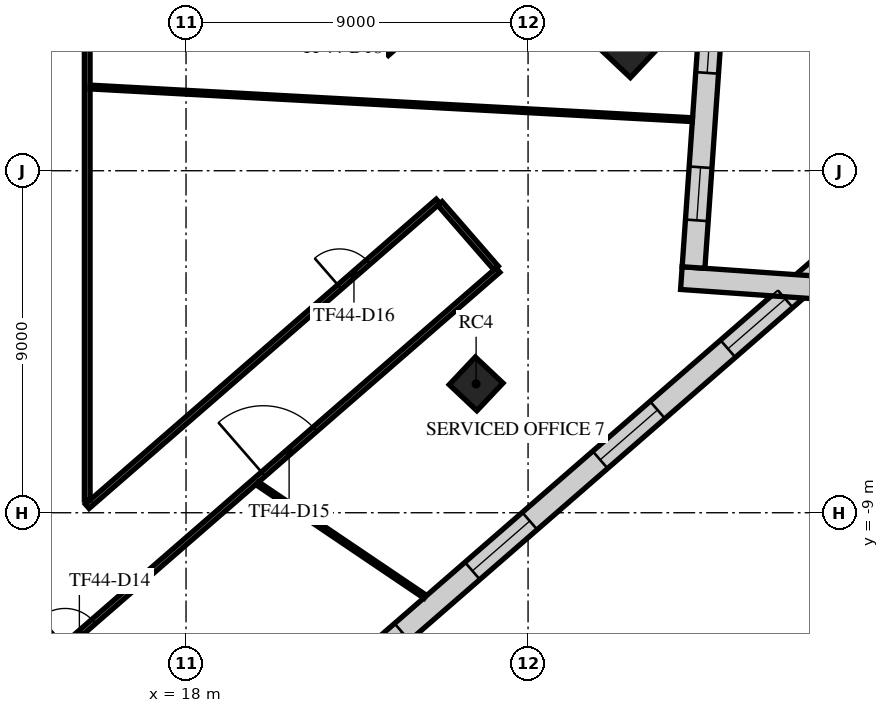
"""IFC4 building model, lengths in metres.
Left out: names, types, materials, properties, quantities, classifications, styles, units other than length and angle.
Written with IfcOpenShell. Run it as: python <this file> out.ifc"""

import sys

from ifc_helpers import new_model, si_unit, direction, frame, frame_2d, origin, origin_2d, place, context, subcontext, project, spatial, rectangle, extrude, element, fill, save


model = new_model("IFC4")
c1 = context("Model", 3, precision=1e-05, world=origin(), true_north=direction((0.0, 1.0)))
c2 = subcontext(c1, "Body", "Model", "MODEL_VIEW")
j1 = project(units=[si_unit("LENGTHUNIT", "METRE"), si_unit("PLANEANGLEUNIT", "RADIAN")], contexts=[c1])
p1 = place(None, origin())
s1 = spatial("IfcSite", under=j1, at=p1, CompositionType="ELEMENT")
p2 = place(p1, origin())
s2 = spatial("IfcBuilding", under=s1, at=p2, CompositionType="ELEMENT")
p3 = place(p2, frame((0.0, 0.0, 193.3)))
s3 = spatial("IfcBuildingStorey", under=s2, at=p3, CompositionType="ELEMENT", Elevation=193.3)
p4 = place(p3, frame((25.633, -5.609, 0.0), z_axis=(0.0, 0.0, 1.0), x_axis=(0.685916152371, 0.727680583715, 0.0)))
e1 = element("IfcColumn", 1, at=p4, inside=s3, PredefinedType="COLUMN", context=c2, shape_type="SweptSolid", body=[
    extrude(rectangle(XDim=1.0, YDim=1.0, at=origin_2d()), origin(), (0.0, 0.0, 1.0), 4.0),
])
p5 = place(p3, frame((29.659, 3.582, 0.0), z_axis=(0.0, 0.0, 1.0), x_axis=(0.685916152371, 0.727680583715, 0.0)))
e2 = element("IfcColumn", 2, at=p5, inside=s3, PredefinedType="COLUMN", context=c2, shape_type="SweptSolid", body=[
    extrude(rectangle(XDim=1.6, YDim=1.6, at=origin_2d()), origin(), (0.0, 0.0, 1.0), 4.0),
])
p6 = place(p3, frame((-2.286, -34.715, 0.0), z_axis=(0.0, 0.0, 1.0), x_axis=(0.754708272811, 0.656060532993, 0.0)))
e3 = element("IfcWall", 3, at=p6, inside=s3, PredefinedType="STANDARD", context=c2, shape_type="SweptSolid", body=[
    extrude(rectangle(XDim=49.0, YDim=0.6, at=frame_2d((24.5, 0.0))), origin(), (0.0, 0.0, 1.0), 3.62),
])
p7 = place(p6, frame((1.227, 0.0, 0.9)))
e4 = element("IfcOpeningElement", 4, at=p7, cuts=e3, PredefinedType="OPENING", context=c2, shape_type="SweptSolid", body=[
    extrude(rectangle(XDim=2.0, YDim=2.1, at=frame_2d((1.0, 1.05))), frame((0.0, 0.31, 0.0), z_axis=(0.0, -1.0, 0.0), x_axis=(1.0, 0.0, 0.0)), (0.0, 0.0, 1.0), 0.62),
])
p8 = place(p6, frame((5.682, 0.0, 0.9)))
e5 = element("IfcOpeningElement", 5, at=p8, cuts=e3, PredefinedType="OPENING", context=c2, shape_type="SweptSolid", body=[
    extrude(rectangle(XDim=2.0, YDim=2.1, at=frame_2d((1.0, 1.05))), frame((0.0, 0.31, 0.0), z_axis=(0.0, -1.0, 0.0), x_axis=(1.0, 0.0, 0.0)), (0.0, 0.0, 1.0), 0.62),
])
p9 = place(p6, frame((10.136, 0.0, 0.9)))
e6 = element("IfcOpeningElement", 6, at=p9, cuts=e3, PredefinedType="OPENING", context=c2, shape_type="SweptSolid", body=[
    extrude(rectangle(XDim=2.0, YDim=2.1, at=frame_2d((1.0, 1.05))), frame((0.0, 0.31, 0.0), z_axis=(0.0, -1.0, 0.0), x_axis=(1.0, 0.0, 0.0)), (0.0, 0.0, 1.0), 0.62),
])
p10 = place(p6, frame((14.591, 0.0, 0.9)))
e7 = element("IfcOpeningElement", 7, at=p10, cuts=e3, PredefinedType="OPENING", context=c2, shape_type="SweptSolid", body=[
    extrude(rectangle(XDim=2.0, YDim=2.1, at=frame_2d((1.0, 1.05))), frame((0.0, 0.31, 0.0), z_axis=(0.0, -1.0, 0.0), x_axis=(1.0, 0.0, 0.0)), (0.0, 0.0, 1.0), 0.62),
])
p11 = place(p6, frame((19.045, 0.0, 0.9)))
e8 = element("IfcOpeningElement", 8, at=p11, cuts=e3, PredefinedType="OPENING", context=c2, shape_type="SweptSolid", body=[
    extrude(rectangle(XDim=2.0, YDim=2.1, at=frame_2d((1.0, 1.05))), frame((0.0, 0.31, 0.0), z_axis=(0.0, -1.0, 0.0), x_axis=(1.0, 0.0, 0.0)), (0.0, 0.0, 1.0), 0.62),
])
p12 = place(p6, frame((23.5, 0.0, 0.9)))
e9 = element("IfcOpeningElement", 9, at=p12, cuts=e3, PredefinedType="OPENING", context=c2, shape_type="SweptSolid", body=[
    extrude(rectangle(XDim=2.0, YDim=2.1, at=frame_2d((1.0, 1.05))), frame((0.0, 0.31, 0.0), z_axis=(0.0, -1.0, 0.0), x_axis=(1.0, 0.0, 0.0)), (0.0, 0.0, 1.0), 0.62),
])
p13 = place(p6, frame((27.955, 0.0, 0.9)))
e10 = element("IfcOpeningElement", 10, at=p13, cuts=e3, PredefinedType="OPENING", context=c2, shape_type="SweptSolid", body=[
    extrude(rectangle(XDim=2.0, YDim=2.1, at=frame_2d((1.0, 1.05))), frame((0.0, 0.31, 0.0), z_axis=(0.0, -1.0, 0.0), x_axis=(1.0, 0.0, 0.0)), (0.0, 0.0, 1.0), 0.62),
])
p14 = place(p6, frame((32.409, 0.0, 0.9)))
e11 = element("IfcOpeningElement", 11, at=p14, cuts=e3, PredefinedType="OPENING", context=c2, shape_type="SweptSolid", body=[
    extrude(rectangle(XDim=2.0, YDim=2.1, at=frame_2d((1.0, 1.05))), frame((0.0, 0.31, 0.0), z_axis=(0.0, -1.0, 0.0), x_axis=(1.0, 0.0, 0.0)), (0.0, 0.0, 1.0), 0.62),
])
p15 = place(p6, frame((36.864, 0.0, 0.9)))
e12 = element("IfcOpeningElement", 12, at=p15, cuts=e3, PredefinedType="OPENING", context=c2, shape_type="SweptSolid", body=[
    extrude(rectangle(XDim=2.0, YDim=2.1, at=frame_2d((1.0, 1.05))), frame((0.0, 0.31, 0.0), z_axis=(0.0, -1.0, 0.0), x_axis=(1.0, 0.0, 0.0)), (0.0, 0.0, 1.0), 0.62),
])
p16 = place(p6, frame((41.318, 0.0, 0.9)))
e13 = element("IfcOpeningElement", 13, at=p16, cuts=e3, PredefinedType="OPENING", context=c2, shape_type="SweptSolid", body=[
    extrude(rectangle(XDim=2.0, YDim=2.1, at=frame_2d((1.0, 1.05))), frame((0.0, 0.31, 0.0), z_axis=(0.0, -1.0, 0.0), x_axis=(1.0, 0.0, 0.0)), (0.0, 0.0, 1.0), 0.62),
])
p17 = place(p6, frame((45.773, 0.0, 0.9)))
e14 = element("IfcOpeningElement", 14, at=p17, cuts=e3, PredefinedType="OPENING", context=c2, shape_type="SweptSolid", body=[
    extrude(rectangle(XDim=2.0, YDim=2.1, at=frame_2d((1.0, 1.05))), frame((0.0, 0.31, 0.0), z_axis=(0.0, -1.0, 0.0), x_axis=(1.0, 0.0, 0.0)), (0.0, 0.0, 1.0), 0.62),
])
p18 = place(p3, frame((34.871, -3.094, 0.0), z_axis=(0.0, 0.0, 1.0), x_axis=(-0.997563916762, 0.069758382828, 0.0)))
e15 = element("IfcWall", 15, at=p18, inside=s3, PredefinedType="STANDARD", context=c2, shape_type="SweptSolid", body=[
    extrude(rectangle(XDim=3.846, YDim=0.6, at=frame_2d((1.923, 0.0))), origin(), (0.0, 0.0, 1.0), 3.62),
])
p19 = place(p3, frame((31.354, -2.547, 0.0), z_axis=(0.0, 0.0, 1.0), x_axis=(0.069743544409, 0.997564954283, 0.0)))
e16 = element("IfcWall", 16, at=p19, inside=s3, PredefinedType="STANDARD", context=c2, shape_type="SweptSolid", body=[
    extrude(rectangle(XDim=7.778, YDim=0.6, at=frame_2d((3.889, 0.0))), origin(), (0.0, 0.0, 1.0), 3.62),
])
p20 = place(p19, frame((1.244, 0.0, 0.9)))
e17 = element("IfcOpeningElement", 17, at=p20, cuts=e16, PredefinedType="OPENING", context=c2, shape_type="SweptSolid", body=[
    extrude(rectangle(XDim=1.4, YDim=2.1, at=frame_2d((0.7, 1.05))), frame((0.0, 0.31, 0.0), z_axis=(0.0, -1.0, 0.0), x_axis=(1.0, 0.0, 0.0)), (0.0, 0.0, 1.0), 0.62),
])
p21 = place(p19, frame((5.134, 0.0, 0.9)))
e18 = element("IfcOpeningElement", 18, at=p21, cuts=e16, PredefinedType="OPENING", context=c2, shape_type="SweptSolid", body=[
    extrude(rectangle(XDim=1.4, YDim=2.1, at=frame_2d((0.7, 1.05))), frame((0.0, 0.31, 0.0), z_axis=(0.0, -1.0, 0.0), x_axis=(1.0, 0.0, 0.0)), (0.0, 0.0, 1.0), 0.62),
])
p22 = place(p3, frame((-1.0, -26.268, 0.0), z_axis=(0.0, 0.0, 1.0), x_axis=(0.754711356604, 0.656056985492, 0.0)))
e19 = element("IfcWall", 19, at=p22, inside=s3, PredefinedType="PARTITIONING", context=c2, shape_type="SweptSolid", body=[
    extrude(rectangle(XDim=36.052, YDim=0.15, at=frame_2d((18.026, 0.0))), origin(), (0.0, 0.0, 1.0), 3.17),
])
p23 = place(p22, frame((9.598, 0.0, 0.0)))
e20 = element("IfcOpeningElement", 20, at=p23, cuts=e19, PredefinedType="OPENING", context=c2, shape_type="SweptSolid", body=[
    extrude(rectangle(XDim=1.0, YDim=2.1, at=frame_2d((0.5, 1.05))), frame((0.0, 0.085, 0.0), z_axis=(0.0, -1.0, 0.0), x_axis=(1.0, 0.0, 0.0)), (0.0, 0.0, 1.0), 0.17),
])
p24 = place(p22, frame((20.957, 0.0, 0.0)))
e21 = element("IfcOpeningElement", 21, at=p24, cuts=e19, PredefinedType="OPENING", context=c2, shape_type="SweptSolid", body=[
    extrude(rectangle(XDim=1.0, YDim=2.1, at=frame_2d((0.5, 1.05))), frame((0.0, 0.085, 0.0), z_axis=(0.0, -1.0, 0.0), x_axis=(1.0, 0.0, 0.0)), (0.0, 0.0, 1.0), 0.17),
])
p25 = place(p22, frame((27.87, 0.0, 0.0)))
e22 = element("IfcOpeningElement", 22, at=p25, cuts=e19, PredefinedType="OPENING", context=c2, shape_type="SweptSolid", body=[
    extrude(rectangle(XDim=1.8, YDim=2.1, at=frame_2d((0.9, 1.05))), frame((0.0, 0.085, 0.0), z_axis=(0.0, -1.0, 0.0), x_axis=(1.0, 0.0, 0.0)), (0.0, 0.0, 1.0), 0.17),
])
p26 = place(p3, frame((15.4, -8.831, 0.0), z_axis=(0.0, 0.0, 1.0), x_axis=(0.754715065445, 0.656052718911, 0.0)))
e23 = element("IfcWall", 23, at=p26, inside=s3, PredefinedType="PARTITIONING", context=c2, shape_type="SweptSolid", body=[
    extrude(rectangle(XDim=12.234, YDim=0.15, at=frame_2d((6.117, 0.0))), origin(), (0.0, 0.0, 1.0), 3.17),
])
p27 = place(p26, frame((8.8, 0.0, 0.0)))
e24 = element("IfcOpeningElement", 24, at=p27, cuts=e23, PredefinedType="OPENING", context=c2, shape_type="SweptSolid", body=[
    extrude(rectangle(XDim=1.0, YDim=2.1, at=frame_2d((0.5, 1.05))), frame((0.0, 0.085, 0.0), z_axis=(0.0, -1.0, 0.0), x_axis=(1.0, 0.0, 0.0)), (0.0, 0.0, 1.0), 0.17),
])
p28 = place(p3, frame((15.4, -8.667, 0.0), z_axis=(0.0, 0.0, 1.0), x_axis=(0.0, 1.0, 0.0)))
e25 = element("IfcWall", 25, at=p28, inside=s3, PredefinedType="PARTITIONING", context=c2, shape_type="SweptSolid", body=[
    extrude(rectangle(XDim=15.944, YDim=0.15, at=frame_2d((7.972, 0.0))), origin(), (0.0, 0.0, 1.0), 3.17),
])
p29 = place(p3, frame((17.805, 9.268, 0.0), z_axis=(0.0, 0.0, 1.0), x_axis=(0.656027059873, -0.754737369364, 0.0)))
e26 = element("IfcWall", 26, at=p29, inside=s3, PredefinedType="PARTITIONING", context=c2, shape_type="SweptSolid", body=[
    extrude(rectangle(XDim=8.251, YDim=0.15, at=frame_2d((4.125, 0.0))), origin(), (0.0, 0.0, 1.0), 3.17),
])
p30 = place(p29, frame((1.05, 0.0, 0.0)))
e27 = element("IfcOpeningElement", 27, at=p30, cuts=e26, PredefinedType="OPENING", context=c2, shape_type="SweptSolid", body=[
    extrude(rectangle(XDim=1.8, YDim=2.1, at=frame_2d((0.9, 1.05))), frame((0.0, 0.085, 0.0), z_axis=(0.0, -1.0, 0.0), x_axis=(1.0, 0.0, 0.0)), (0.0, 0.0, 1.0), 0.17),
])
p31 = place(p29, frame((6.05, 0.0, 0.0)))
e28 = element("IfcOpeningElement", 28, at=p31, cuts=e26, PredefinedType="OPENING", context=c2, shape_type="SweptSolid", body=[
    extrude(rectangle(XDim=1.0, YDim=2.1, at=frame_2d((0.5, 1.05))), frame((0.0, 0.085, 0.0), z_axis=(0.0, -1.0, 0.0), x_axis=(1.0, 0.0, 0.0)), (0.0, 0.0, 1.0), 0.17),
])
p32 = place(p3, frame((23.275, 3.09, 0.0), z_axis=(0.0, 0.0, 1.0), x_axis=(0.754495728819, 0.656304955942, 0.0)))
e29 = element("IfcWall", 29, at=p32, inside=s3, PredefinedType="PARTITIONING", context=c2, shape_type="SweptSolid", body=[
    extrude(rectangle(XDim=2.25, YDim=0.15, at=frame_2d((1.125, 0.0))), origin(), (0.0, 0.0, 1.0), 3.17),
])
p33 = place(p3, frame((24.682, -0.862, 0.0), z_axis=(0.0, 0.0, 1.0), x_axis=(0.656243185308, -0.754549456123, 0.0)))
e30 = element("IfcWall", 30, at=p33, inside=s3, PredefinedType="PARTITIONING", context=c2, shape_type="SweptSolid", body=[
    extrude(rectangle(XDim=2.25, YDim=0.15, at=frame_2d((1.125, 0.0))), origin(), (0.0, 0.0, 1.0), 3.17),
])
p34 = place(p3, frame((15.478, 2.203, 0.0), z_axis=(0.0, 0.0, 1.0), x_axis=(0.998532575908, -0.054154361321, 0.0)))
e31 = element("IfcWall", 31, at=p34, inside=s3, PredefinedType="PARTITIONING", context=c2, shape_type="SweptSolid", body=[
    extrude(rectangle(XDim=15.869, YDim=0.1, at=frame_2d((7.935, 0.0))), origin(), (0.0, 0.0, 1.0), 3.62),
])
p35 = place(p3, frame((19.882, -8.231, 0.0), z_axis=(0.0, 0.0, 1.0), x_axis=(0.828654525471, -0.559760374997, 0.0)))
e32 = element("IfcWall", 32, at=p35, inside=s3, PredefinedType="PARTITIONING", context=c2, shape_type="SweptSolid", body=[
    extrude(rectangle(XDim=5.322, YDim=0.1, at=frame_2d((2.661, 0.0))), origin(), (0.0, 0.0, 1.0), 3.62),
])
p36 = place(p14, origin())
e33 = element("IfcWindow", 33, at=p36, inside=s3, PartitioningType="SINGLE_PANEL", PredefinedType="WINDOW", context=c2, shape_type="SweptSolid", body=[
    extrude(rectangle(XDim=2.0, YDim=2.1, at=frame_2d((1.0, 1.05))), frame((0.0, 0.03, 0.0), z_axis=(0.0, -1.0, 0.0), x_axis=(1.0, 0.0, 0.0)), (0.0, 0.0, 1.0), 0.06),
])
fill(e11, e33)
p37 = place(p15, origin())
e34 = element("IfcWindow", 34, at=p37, inside=s3, PartitioningType="SINGLE_PANEL", PredefinedType="WINDOW", context=c2, shape_type="SweptSolid", body=[
    extrude(rectangle(XDim=2.0, YDim=2.1, at=frame_2d((1.0, 1.05))), frame((0.0, 0.03, 0.0), z_axis=(0.0, -1.0, 0.0), x_axis=(1.0, 0.0, 0.0)), (0.0, 0.0, 1.0), 0.06),
])
fill(e12, e34)
p38 = place(p16, origin())
e35 = element("IfcWindow", 35, at=p38, inside=s3, PartitioningType="SINGLE_PANEL", PredefinedType="WINDOW", context=c2, shape_type="SweptSolid", body=[
    extrude(rectangle(XDim=2.0, YDim=2.1, at=frame_2d((1.0, 1.05))), frame((0.0, 0.03, 0.0), z_axis=(0.0, -1.0, 0.0), x_axis=(1.0, 0.0, 0.0)), (0.0, 0.0, 1.0), 0.06),
])
fill(e13, e35)
p39 = place(p17, origin())
e36 = element("IfcWindow", 36, at=p39, inside=s3, PartitioningType="SINGLE_PANEL", PredefinedType="WINDOW", context=c2, shape_type="SweptSolid", body=[
    extrude(rectangle(XDim=2.0, YDim=2.1, at=frame_2d((1.0, 1.05))), frame((0.0, 0.03, 0.0), z_axis=(0.0, -1.0, 0.0), x_axis=(1.0, 0.0, 0.0)), (0.0, 0.0, 1.0), 0.06),
])
fill(e14, e36)
p40 = place(p20, origin())
e37 = element("IfcWindow", 37, at=p40, inside=s3, PartitioningType="SINGLE_PANEL", PredefinedType="WINDOW", context=c2, shape_type="SweptSolid", body=[
    extrude(rectangle(XDim=1.4, YDim=2.1, at=frame_2d((0.7, 1.05))), frame((0.0, 0.03, 0.0), z_axis=(0.0, -1.0, 0.0), x_axis=(1.0, 0.0, 0.0)), (0.0, 0.0, 1.0), 0.06),
])
fill(e17, e37)
p41 = place(p21, origin())
e38 = element("IfcWindow", 38, at=p41, inside=s3, PartitioningType="SINGLE_PANEL", PredefinedType="WINDOW", context=c2, shape_type="SweptSolid", body=[
    extrude(rectangle(XDim=1.4, YDim=2.1, at=frame_2d((0.7, 1.05))), frame((0.0, 0.03, 0.0), z_axis=(0.0, -1.0, 0.0), x_axis=(1.0, 0.0, 0.0)), (0.0, 0.0, 1.0), 0.06),
])
fill(e18, e38)
p42 = place(p24, frame((1.0, 0.0, 0.0), z_axis=(0.0, 0.0, 1.0), x_axis=(-1.0, 0.0, 0.0)))
e39 = element("IfcDoor", 39, at=p42, inside=s3, OperationType="SINGLE_SWING_LEFT", PredefinedType="DOOR", context=c2, shape_type="SweptSolid", body=[
    extrude(rectangle(XDim=1.0, YDim=2.1, at=frame_2d((0.5, 1.05))), frame((0.0, 0.025, 0.0), z_axis=(0.0, -1.0, 0.0), x_axis=(1.0, 0.0, 0.0)), (0.0, 0.0, 1.0), 0.05),
])
fill(e21, e39)
p43 = place(p25, frame((1.8, 0.0, 0.0), z_axis=(0.0, 0.0, 1.0), x_axis=(-1.0, 0.0, 0.0)))
e40 = element("IfcDoor", 40, at=p43, inside=s3, OperationType="DOUBLE_DOOR_SINGLE_SWING", PredefinedType="DOOR", context=c2, shape_type="SweptSolid", body=[
    extrude(rectangle(XDim=1.8, YDim=2.1, at=frame_2d((0.9, 1.05))), frame((0.0, 0.025, 0.0), z_axis=(0.0, -1.0, 0.0), x_axis=(1.0, 0.0, 0.0)), (0.0, 0.0, 1.0), 0.05),
])
fill(e22, e40)
p44 = place(p27, origin())
e41 = element("IfcDoor", 41, at=p44, inside=s3, OperationType="SINGLE_SWING_LEFT", PredefinedType="DOOR", context=c2, shape_type="SweptSolid", body=[
    extrude(rectangle(XDim=1.0, YDim=2.1, at=frame_2d((0.5, 1.05))), frame((0.0, 0.025, 0.0), z_axis=(0.0, -1.0, 0.0), x_axis=(1.0, 0.0, 0.0)), (0.0, 0.0, 1.0), 0.05),
])
fill(e24, e41)
save(model, sys.argv[1])
